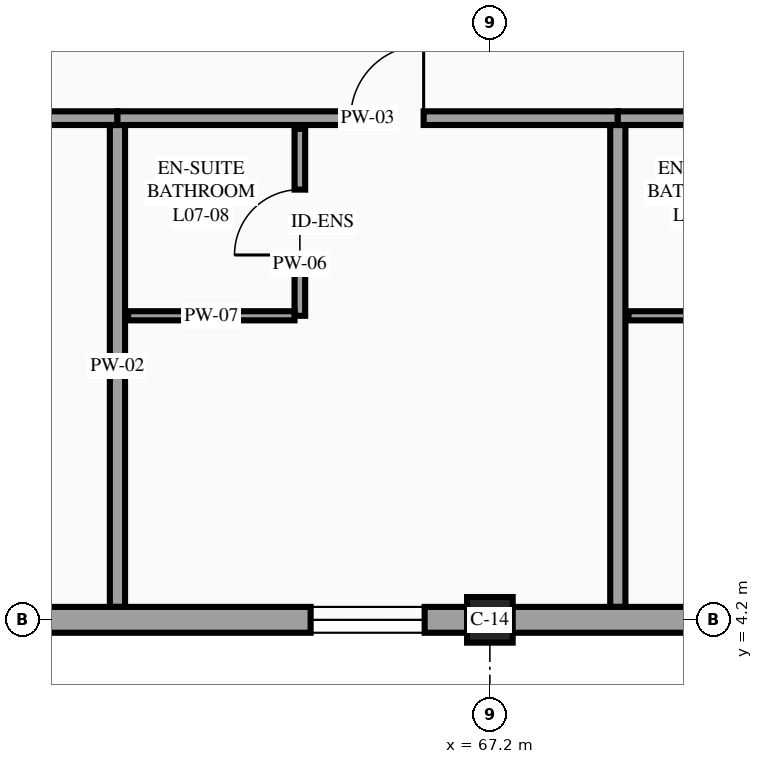
"""IFC4 building model, lengths in metres.
Left out: names, types, materials, properties, quantities, classifications, styles, units other than length and angle.
Written with IfcOpenShell. Run it as: python <this file> out.ifc"""

import sys

from ifc_helpers import new_model, si_unit, direction, frame, frame_2d, origin, origin_2d, place, context, subcontext, project, spatial, rectangle, extrude, element, fill, save


model = new_model("IFC4")
c1 = context("Model", 3, precision=1e-05, world=origin(), true_north=direction((0.0, 1.0)))
c2 = subcontext(c1, "Body", "Model", "MODEL_VIEW")
j1 = project(units=[si_unit("LENGTHUNIT", "METRE"), si_unit("PLANEANGLEUNIT", "RADIAN")], contexts=[c1])
p1 = place(None, origin())
s1 = spatial("IfcSite", under=j1, at=p1, CompositionType="ELEMENT")
p2 = place(p1, origin())
s2 = spatial("IfcBuilding", under=s1, at=p2, CompositionType="ELEMENT")
p3 = place(p2, frame((0.0, 0.0, 29.1)))
s3 = spatial("IfcBuildingStorey", under=s2, at=p3, CompositionType="ELEMENT", Elevation=29.1)
p4 = place(p3, frame((67.2, 4.2, 0.0), z_axis=(0.0, 0.0, 1.0), x_axis=(1.0, 0.0, 0.0)))
e1 = element("IfcColumn", 1, at=p4, inside=s3, PredefinedType="COLUMN", context=c2, shape_type="SweptSolid", body=[
    extrude(rectangle(XDim=0.6, YDim=0.6, at=origin_2d()), origin(), (0.0, 0.0, 1.0), 3.6),
])
p5 = place(p3, frame((55.717, 10.8, 0.0), z_axis=(0.0, 0.0, 1.0), x_axis=(1.0, 0.0, 0.0)))
e2 = element("IfcWall", 2, at=p5, inside=s3, PredefinedType="PARTITIONING", context=c2, shape_type="SweptSolid", body=[
    extrude(rectangle(XDim=6.583, YDim=0.18, at=frame_2d((3.292, 0.0))), origin(), (0.0, 0.0, 1.0), 3.375),
])
p6 = place(p5, frame((4.469, 0.0, 0.0)))
e3 = element("IfcOpeningElement", 3, at=p6, cuts=e2, PredefinedType="OPENING", context=c2, shape_type="SweptSolid", body=[
    extrude(rectangle(XDim=0.96, YDim=2.15, at=frame_2d((0.48, 1.075))), frame((0.0, 0.1, 0.0), z_axis=(0.0, -1.0, 0.0), x_axis=(1.0, 0.0, 0.0)), (0.0, 0.0, 1.0), 0.2),
])
p7 = place(p3, frame((62.3, 4.37, 0.0), z_axis=(0.0, 0.0, 1.0), x_axis=(0.0, 1.0, 0.0)))
e4 = element("IfcWall", 4, at=p7, inside=s3, PredefinedType="PARTITIONING", context=c2, shape_type="SweptSolid", body=[
    extrude(rectangle(XDim=6.34, YDim=0.2, at=frame_2d((3.17, 0.0))), origin(), (0.0, 0.0, 1.0), 3.375),
])
p8 = place(p3, frame((62.3, 10.8, 0.0), z_axis=(0.0, 0.0, 1.0), x_axis=(1.0, 0.0, 0.0)))
e5 = element("IfcWall", 5, at=p8, inside=s3, PredefinedType="PARTITIONING", context=c2, shape_type="SweptSolid", body=[
    extrude(rectangle(XDim=6.583, YDim=0.18, at=frame_2d((3.292, 0.0))), origin(), (0.0, 0.0, 1.0), 3.375),
])
p9 = place(p8, frame((3.069, 0.0, 0.0)))
e6 = element("IfcOpeningElement", 6, at=p9, cuts=e5, PredefinedType="OPENING", context=c2, shape_type="SweptSolid", body=[
    extrude(rectangle(XDim=0.96, YDim=2.15, at=frame_2d((0.48, 1.075))), frame((0.0, 0.1, 0.0), z_axis=(0.0, -1.0, 0.0), x_axis=(1.0, 0.0, 0.0)), (0.0, 0.0, 1.0), 0.2),
])
p10 = place(p3, frame((68.883, 4.37, 0.0), z_axis=(0.0, 0.0, 1.0), x_axis=(0.0, 1.0, 0.0)))
e7 = element("IfcWall", 7, at=p10, inside=s3, PredefinedType="PARTITIONING", context=c2, shape_type="SweptSolid", body=[
    extrude(rectangle(XDim=6.34, YDim=0.2, at=frame_2d((3.17, 0.0))), origin(), (0.0, 0.0, 1.0), 3.375),
])
p11 = place(p3, frame((64.7, 8.2, 0.0), z_axis=(0.0, 0.0, 1.0), x_axis=(0.0, 1.0, 0.0)))
e8 = element("IfcWall", 8, at=p11, inside=s3, PredefinedType="PARTITIONING", context=c2, shape_type="SweptSolid", body=[
    extrude(rectangle(XDim=2.46, YDim=0.14, at=frame_2d((1.23, 0.0))), origin(), (0.0, 0.0, 1.0), 3.375),
])
p12 = place(p11, frame((0.8, 0.0, 0.0)))
e9 = element("IfcOpeningElement", 9, at=p12, cuts=e8, PredefinedType="OPENING", context=c2, shape_type="SweptSolid", body=[
    extrude(rectangle(XDim=0.86, YDim=2.1, at=frame_2d((0.43, 1.05))), frame((0.0, 0.08, 0.0), z_axis=(0.0, -1.0, 0.0), x_axis=(1.0, 0.0, 0.0)), (0.0, 0.0, 1.0), 0.16),
])
p13 = place(p3, frame((62.44, 8.2, 0.0), z_axis=(0.0, 0.0, 1.0), x_axis=(1.0, 0.0, 0.0)))
e10 = element("IfcWall", 10, at=p13, inside=s3, PredefinedType="PARTITIONING", context=c2, shape_type="SweptSolid", body=[
    extrude(rectangle(XDim=2.19, YDim=0.12, at=frame_2d((1.095, 0.0))), origin(), (0.0, 0.0, 1.0), 3.375),
])
p14 = place(p3, frame((68.883, 10.8, 0.0), z_axis=(0.0, 0.0, 1.0), x_axis=(1.0, 0.0, 0.0)))
e11 = element("IfcWall", 11, at=p14, inside=s3, PredefinedType="PARTITIONING", context=c2, shape_type="SweptSolid", body=[
    extrude(rectangle(XDim=6.583, YDim=0.18, at=frame_2d((3.292, 0.0))), origin(), (0.0, 0.0, 1.0), 3.375),
])
p15 = place(p14, frame((4.469, 0.0, 0.0)))
e12 = element("IfcOpeningElement", 12, at=p15, cuts=e11, PredefinedType="OPENING", context=c2, shape_type="SweptSolid", body=[
    extrude(rectangle(XDim=0.96, YDim=2.15, at=frame_2d((0.48, 1.075))), frame((0.0, 0.1, 0.0), z_axis=(0.0, -1.0, 0.0), x_axis=(1.0, 0.0, 0.0)), (0.0, 0.0, 1.0), 0.2),
])
p16 = place(p3, frame((69.023, 8.2, 0.0), z_axis=(0.0, 0.0, 1.0), x_axis=(1.0, 0.0, 0.0)))
e13 = element("IfcWall", 13, at=p16, inside=s3, PredefinedType="PARTITIONING", context=c2, shape_type="SweptSolid", body=[
    extrude(rectangle(XDim=2.19, YDim=0.12, at=frame_2d((1.095, 0.0))), origin(), (0.0, 0.0, 1.0), 3.375),
])
p17 = place(p3, frame((58.8, 4.2, 0.0), z_axis=(0.0, 0.0, 1.0), x_axis=(1.0, 0.0, 0.0)))
e14 = element("IfcWall", 14, at=p17, inside=s3, PredefinedType="STANDARD", context=c2, shape_type="SweptSolid", body=[
    extrude(rectangle(XDim=8.4, YDim=0.34, at=frame_2d((4.2, 0.0))), origin(), (0.0, 0.0, 1.0), 2.73),
])
p18 = place(p17, frame((0.708, 0.0, 0.85)))
e15 = element("IfcOpeningElement", 15, at=p18, cuts=e14, PredefinedType="OPENING", context=c2, shape_type="SweptSolid", body=[
    extrude(rectangle(XDim=1.5, YDim=1.5, at=frame_2d((0.75, 0.75))), frame((0.0, 0.18, 0.0), z_axis=(0.0, -1.0, 0.0), x_axis=(1.0, 0.0, 0.0)), (0.0, 0.0, 1.0), 0.36),
])
p19 = place(p17, frame((6.042, 0.0, 0.85)))
e16 = element("IfcOpeningElement", 16, at=p19, cuts=e14, PredefinedType="OPENING", context=c2, shape_type="SweptSolid", body=[
    extrude(rectangle(XDim=1.5, YDim=1.5, at=frame_2d((0.75, 0.75))), frame((0.0, 0.18, 0.0), z_axis=(0.0, -1.0, 0.0), x_axis=(1.0, 0.0, 0.0)), (0.0, 0.0, 1.0), 0.36),
])
p20 = place(p3, frame((67.2, 4.2, 0.0), z_axis=(0.0, 0.0, 1.0), x_axis=(1.0, 0.0, 0.0)))
e17 = element("IfcWall", 17, at=p20, inside=s3, PredefinedType="STANDARD", context=c2, shape_type="SweptSolid", body=[
    extrude(rectangle(XDim=8.4, YDim=0.34, at=frame_2d((4.2, 0.0))), origin(), (0.0, 0.0, 1.0), 3.075),
])
p21 = place(p20, frame((4.225, 0.0, 0.85)))
e18 = element("IfcOpeningElement", 18, at=p21, cuts=e17, PredefinedType="OPENING", context=c2, shape_type="SweptSolid", body=[
    extrude(rectangle(XDim=1.5, YDim=1.5, at=frame_2d((0.75, 0.75))), frame((0.0, 0.18, 0.0), z_axis=(0.0, -1.0, 0.0), x_axis=(1.0, 0.0, 0.0)), (0.0, 0.0, 1.0), 0.36),
])
p22 = place(p19, origin())
e19 = element("IfcWindow", 19, at=p22, inside=s3, PartitioningType="SINGLE_PANEL", PredefinedType="WINDOW", context=c2, shape_type="SweptSolid", body=[
    extrude(rectangle(XDim=1.5, YDim=1.5, at=frame_2d((0.75, 0.75))), frame((0.0, 0.03, 0.0), z_axis=(0.0, -1.0, 0.0), x_axis=(1.0, 0.0, 0.0)), (0.0, 0.0, 1.0), 0.06),
])
fill(e16, e19)
p23 = place(p9, origin())
e20 = element("IfcDoor", 20, at=p23, inside=s3, OperationType="SINGLE_SWING_RIGHT", PredefinedType="DOOR", context=c2, shape_type="SweptSolid", body=[
    extrude(rectangle(XDim=0.96, YDim=2.15, at=frame_2d((0.48, 1.075))), frame((0.0, 0.025, 0.0), z_axis=(0.0, -1.0, 0.0), x_axis=(1.0, 0.0, 0.0)), (0.0, 0.0, 1.0), 0.05),
])
fill(e6, e20)
p24 = place(p12, origin())
e21 = element("IfcDoor", 21, at=p24, inside=s3, OperationType="SINGLE_SWING_LEFT", PredefinedType="DOOR", context=c2, shape_type="SweptSolid", body=[
    extrude(rectangle(XDim=0.86, YDim=2.1, at=frame_2d((0.43, 1.05))), frame((0.0, 0.025, 0.0), z_axis=(0.0, -1.0, 0.0), x_axis=(1.0, 0.0, 0.0)), (0.0, 0.0, 1.0), 0.05),
])
fill(e9, e21)
save(model, sys.argv[1])
